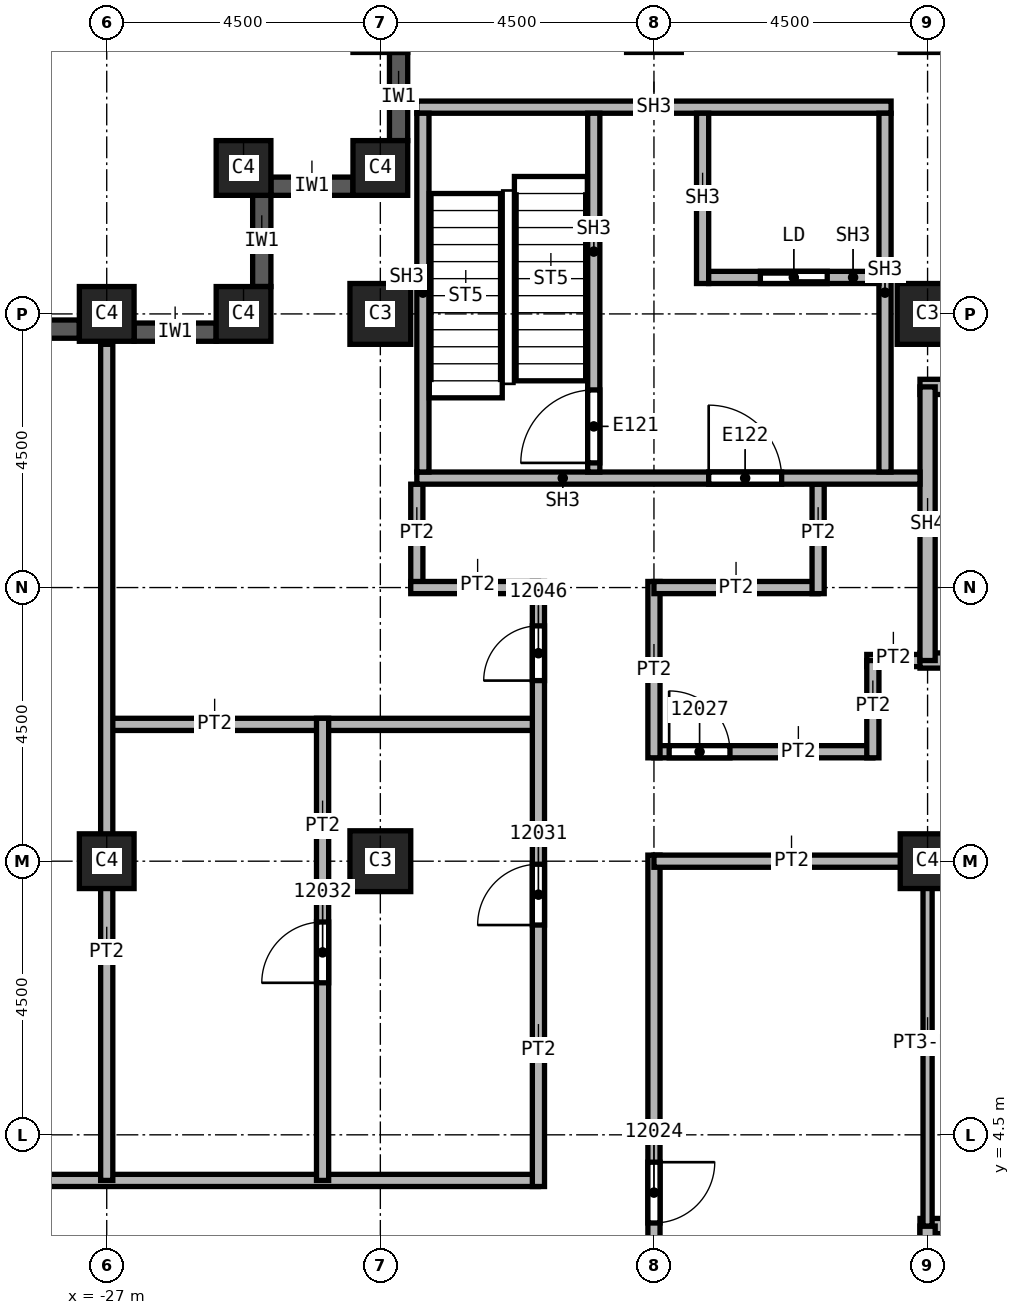
"""IFC4 building model, lengths in metres.
Left out: names, types, materials, properties, quantities, classifications, styles, units other than length and angle.
Written with IfcOpenShell. Run it as: python <this file> out.ifc"""

import sys

from ifc_helpers import new_model, si_unit, direction, frame, frame_2d, origin, origin_2d, place, context, subcontext, project, spatial, rectangle, extrude, element, fill, save


model = new_model("IFC4")
c1 = context("Model", 3, precision=1e-05, world=origin(), true_north=direction((0.0, 1.0)))
c2 = subcontext(c1, "Body", "Model", "MODEL_VIEW")
j1 = project(units=[si_unit("LENGTHUNIT", "METRE"), si_unit("PLANEANGLEUNIT", "RADIAN")], contexts=[c1])
p1 = place(None, origin())
s1 = spatial("IfcSite", under=j1, at=p1, CompositionType="ELEMENT")
p2 = place(p1, origin())
s2 = spatial("IfcBuilding", under=s1, at=p2, CompositionType="ELEMENT")
p3 = place(p2, frame((0.0, 0.0, 196.0)))
s3 = spatial("IfcBuildingStorey", under=s2, at=p3, CompositionType="ELEMENT", Elevation=196.0)
for number, where, z_axis, x_axis in (
    (1, (-13.5, 18.0, 0.0), (0.0, 0.0, 1.0), (1.0, 0.0, 0.0)),
    (2, (-22.5, 9.0, 0.0), (0.0, 0.0, 1.0), (1.0, 0.0, 0.0)),
    (3, (-22.5, 18.0, 0.0), (0.0, 0.0, 1.0), (1.0, 0.0, 0.0)),
):
    element("IfcColumn", number, at=place(p3, frame(where, z_axis=z_axis, x_axis=x_axis)), inside=s3, PredefinedType="COLUMN", context=c2, shape_type="SweptSolid", body=[
        extrude(rectangle(XDim=1.0, YDim=1.0, at=origin_2d()), origin(), (0.0, 0.0, 1.0), 3.72),
    ])
for number, where, z_axis, x_axis in (
    (4, (-13.5, 9.0, 0.0), (0.0, 0.0, 1.0), (1.0, 0.0, 0.0)),
    (5, (-27.0, 9.0, 0.0), (0.0, 0.0, 1.0), (1.0, 0.0, 0.0)),
    (6, (-27.0, 18.0, 0.0), (0.0, 0.0, 1.0), (1.0, 0.0, 0.0)),
    (7, (-22.5, 20.4, 0.0), (0.0, 0.0, 1.0), (1.0, 0.0, 0.0)),
    (8, (-24.75, 20.4, 0.0), (0.0, 0.0, 1.0), (1.0, 0.0, 0.0)),
    (9, (-24.75, 18.0, 0.0), (0.0, 0.0, 1.0), (1.0, 0.0, 0.0)),
):
    element("IfcColumn", number, at=place(p3, frame(where, z_axis=z_axis, x_axis=x_axis)), inside=s3, PredefinedType="COLUMN", context=c2, shape_type="SweptSolid", body=[
        extrude(rectangle(XDim=0.9, YDim=0.9, at=origin_2d()), origin(), (0.0, 0.0, 1.0), 3.72),
    ])
p4 = place(p3, frame((-22.95, 20.1, 0.0), z_axis=(0.0, 0.0, 1.0), x_axis=(-1.0, 0.0, 0.0)))
e10 = element("IfcWall", 10, at=p4, inside=s3, PredefinedType="SOLIDWALL", context=c2, shape_type="SweptSolid", body=[
    extrude(rectangle(XDim=1.35, YDim=0.3, at=frame_2d((0.675, 0.0))), origin(), (0.0, 0.0, 1.0), 3.12),
])
p5 = place(p3, frame((-24.45, 19.95, 0.0), z_axis=(0.0, 0.0, 1.0), x_axis=(0.0, -1.0, 0.0)))
e11 = element("IfcWall", 11, at=p5, inside=s3, PredefinedType="SOLIDWALL", context=c2, shape_type="SweptSolid", body=[
    extrude(rectangle(XDim=1.5, YDim=0.3, at=frame_2d((0.75, 0.0))), origin(), (0.0, 0.0, 1.0), 3.12),
])
p6 = place(p3, frame((-25.2, 17.7, 0.0), z_axis=(0.0, 0.0, 1.0), x_axis=(-1.0, 0.0, 0.0)))
e12 = element("IfcWall", 12, at=p6, inside=s3, PredefinedType="SOLIDWALL", context=c2, shape_type="SweptSolid", body=[
    extrude(rectangle(XDim=1.35, YDim=0.3, at=frame_2d((0.675, 0.0))), origin(), (0.0, 0.0, 1.0), 3.12),
])
p7 = place(p3, frame((-27.45, 17.75, 0.0), z_axis=(0.0, 0.0, 1.0), x_axis=(-1.0, 0.0, 0.0)))
e13 = element("IfcWall", 13, at=p7, inside=s3, PredefinedType="SOLIDWALL", context=c2, shape_type="SweptSolid", body=[
    extrude(rectangle(XDim=3.6, YDim=0.3, at=frame_2d((1.8, 0.0))), origin(), (0.0, 0.0, 1.0), 3.12),
])
p8 = place(p7, frame((0.6, 0.0, 0.8)))
e14 = element("IfcOpeningElement", 14, at=p8, cuts=e13, PredefinedType="OPENING", context=c2, shape_type="SweptSolid", body=[
    extrude(rectangle(XDim=2.4, YDim=1.95, at=frame_2d((1.2, 0.975))), frame((0.0, 0.15, 0.0), z_axis=(0.0, -1.0, 0.0), x_axis=(1.0, 0.0, 0.0)), (0.0, 0.0, 1.0), 0.3),
])
p9 = place(p3, frame((-22.2, 22.3, 0.0), z_axis=(0.0, 0.0, 1.0), x_axis=(0.0, -1.0, 0.0)))
e15 = element("IfcWall", 15, at=p9, inside=s3, PredefinedType="SOLIDWALL", context=c2, shape_type="SweptSolid", body=[
    extrude(rectangle(XDim=1.45, YDim=0.3, at=frame_2d((0.725, 0.0))), origin(), (0.0, 0.0, 1.0), 3.12),
])
p10 = place(p3, frame((-33.85, 3.75, 0.0), z_axis=(0.0, 0.0, 1.0), x_axis=(1.0, 0.0, 0.0)))
e16 = element("IfcWall", 16, at=p10, inside=s3, PredefinedType="PARTITIONING", context=c2, shape_type="SweptSolid", body=[
    extrude(rectangle(XDim=13.95, YDim=0.2, at=frame_2d((6.975, 0.0))), origin(), (0.0, 0.0, 1.0), 3.72),
])
p11 = place(p3, frame((-27.1, 11.25, 0.0), z_axis=(0.0, 0.0, 1.0), x_axis=(1.0, 0.0, 0.0)))
e17 = element("IfcWall", 17, at=p11, inside=s3, PredefinedType="PARTITIONING", context=c2, shape_type="SweptSolid", body=[
    extrude(rectangle(XDim=7.2, YDim=0.2, at=frame_2d((3.6, 0.0))), origin(), (0.0, 0.0, 1.0), 3.72),
])
p12 = place(p3, frame((-27.0, 3.75, 0.0), z_axis=(0.0, 0.0, 1.0), x_axis=(0.0, 1.0, 0.0)))
e18 = element("IfcWall", 18, at=p12, inside=s3, PredefinedType="PARTITIONING", context=c2, shape_type="SweptSolid", body=[
    extrude(rectangle(XDim=13.75, YDim=0.2, at=frame_2d((6.875, 0.0))), origin(), (0.0, 0.0, 1.0), 3.72),
])
p13 = place(p3, frame((-23.45, 3.75, 0.0), z_axis=(0.0, 0.0, 1.0), x_axis=(0.0, 1.0, 0.0)))
e19 = element("IfcWall", 19, at=p13, inside=s3, PredefinedType="PARTITIONING", context=c2, shape_type="SweptSolid", body=[
    extrude(rectangle(XDim=7.6, YDim=0.2, at=frame_2d((3.8, 0.0))), origin(), (0.0, 0.0, 1.0), 3.72),
])
p14 = place(p13, frame((3.25, 0.0, 0.0)))
e20 = element("IfcOpeningElement", 20, at=p14, cuts=e19, PredefinedType="OPENING", context=c2, shape_type="SweptSolid", body=[
    extrude(rectangle(XDim=1.0, YDim=2.1, at=frame_2d((0.5, 1.05))), frame((0.0, 0.1, 0.0), z_axis=(0.0, -1.0, 0.0), x_axis=(1.0, 0.0, 0.0)), (0.0, 0.0, 1.0), 0.2),
])
p15 = place(p3, frame((-21.9, 13.5, 0.0), z_axis=(0.0, 0.0, 1.0), x_axis=(0.0, 1.0, 0.0)))
e21 = element("IfcWall", 21, at=p15, inside=s3, PredefinedType="PARTITIONING", context=c2, shape_type="SweptSolid", body=[
    extrude(rectangle(XDim=1.7, YDim=0.2, at=frame_2d((0.85, 0.0))), origin(), (0.0, 0.0, 1.0), 3.72),
])
p16 = place(p3, frame((-19.9, 3.65, 0.0), z_axis=(0.0, 0.0, 1.0), x_axis=(0.0, 1.0, 0.0)))
e22 = element("IfcWall", 22, at=p16, inside=s3, PredefinedType="PARTITIONING", context=c2, shape_type="SweptSolid", body=[
    extrude(rectangle(XDim=9.95, YDim=0.2, at=frame_2d((4.975, 0.0))), origin(), (0.0, 0.0, 1.0), 3.72),
])
p17 = place(p16, frame((4.3, 0.0, 0.0)))
e23 = element("IfcOpeningElement", 23, at=p17, cuts=e22, PredefinedType="OPENING", context=c2, shape_type="SweptSolid", body=[
    extrude(rectangle(XDim=1.0, YDim=2.1, at=frame_2d((0.5, 1.05))), frame((0.0, 0.1, 0.0), z_axis=(0.0, -1.0, 0.0), x_axis=(1.0, 0.0, 0.0)), (0.0, 0.0, 1.0), 0.2),
])
p18 = place(p16, frame((8.32, 0.0, 0.0)))
e24 = element("IfcOpeningElement", 24, at=p18, cuts=e22, PredefinedType="OPENING", context=c2, shape_type="SweptSolid", body=[
    extrude(rectangle(XDim=0.9, YDim=2.1, at=frame_2d((0.45, 1.05))), frame((0.0, 0.1, 0.0), z_axis=(0.0, -1.0, 0.0), x_axis=(1.0, 0.0, 0.0)), (0.0, 0.0, 1.0), 0.2),
])
p19 = place(p3, frame((-19.9, 13.5, 0.0), z_axis=(0.0, 0.0, 1.0), x_axis=(-1.0, 0.0, 0.0)))
e25 = element("IfcWall", 25, at=p19, inside=s3, PredefinedType="PARTITIONING", context=c2, shape_type="SweptSolid", body=[
    extrude(rectangle(XDim=2.1, YDim=0.2, at=frame_2d((1.05, 0.0))), origin(), (0.0, 0.0, 1.0), 3.72),
])
p20 = place(p3, frame((-18.0, 9.1, 0.0), z_axis=(0.0, 0.0, 1.0), x_axis=(0.0, -1.0, 0.0)))
e26 = element("IfcWall", 26, at=p20, inside=s3, PredefinedType="PARTITIONING", context=c2, shape_type="SweptSolid", body=[
    extrude(rectangle(XDim=18.2, YDim=0.2, at=frame_2d((9.1, 0.0))), origin(), (0.0, 0.0, 1.0), 3.72),
])
p21 = place(p20, frame((14.95, 0.0, 0.0)))
e27 = element("IfcOpeningElement", 27, at=p21, cuts=e26, PredefinedType="OPENING", context=c2, shape_type="SweptSolid", body=[
    extrude(rectangle(XDim=1.0, YDim=2.1, at=frame_2d((0.5, 1.05))), frame((0.0, 0.1, 0.0), z_axis=(0.0, -1.0, 0.0), x_axis=(1.0, 0.0, 0.0)), (0.0, 0.0, 1.0), 0.2),
])
p22 = place(p20, frame((5.05, 0.0, 0.0)))
e28 = element("IfcOpeningElement", 28, at=p22, cuts=e26, PredefinedType="OPENING", context=c2, shape_type="SweptSolid", body=[
    extrude(rectangle(XDim=1.0, YDim=2.1, at=frame_2d((0.5, 1.05))), frame((0.0, 0.1, 0.0), z_axis=(0.0, -1.0, 0.0), x_axis=(1.0, 0.0, 0.0)), (0.0, 0.0, 1.0), 0.2),
])
p23 = place(p3, frame((-18.0, 10.8, 0.0), z_axis=(0.0, 0.0, 1.0), x_axis=(1.0, 0.0, 0.0)))
e29 = element("IfcWall", 29, at=p23, inside=s3, PredefinedType="PARTITIONING", context=c2, shape_type="SweptSolid", body=[
    extrude(rectangle(XDim=3.6, YDim=0.2, at=frame_2d((1.8, 0.0))), origin(), (0.0, 0.0, 1.0), 3.72),
])
p24 = place(p23, frame((0.25, 0.0, 0.0)))
e30 = element("IfcOpeningElement", 30, at=p24, cuts=e29, PredefinedType="OPENING", context=c2, shape_type="SweptSolid", body=[
    extrude(rectangle(XDim=1.0, YDim=2.1, at=frame_2d((0.5, 1.05))), frame((0.0, 0.1, 0.0), z_axis=(0.0, -1.0, 0.0), x_axis=(1.0, 0.0, 0.0)), (0.0, 0.0, 1.0), 0.2),
])
p25 = place(p3, frame((-18.0, 13.6, 0.0), z_axis=(0.0, 0.0, 1.0), x_axis=(0.0, -1.0, 0.0)))
e31 = element("IfcWall", 31, at=p25, inside=s3, PredefinedType="PARTITIONING", context=c2, shape_type="SweptSolid", body=[
    extrude(rectangle(XDim=2.9, YDim=0.2, at=frame_2d((1.45, 0.0))), origin(), (0.0, 0.0, 1.0), 3.72),
])
p26 = place(p3, frame((-15.3, 13.5, 0.0), z_axis=(0.0, 0.0, 1.0), x_axis=(-1.0, 0.0, 0.0)))
e32 = element("IfcWall", 32, at=p26, inside=s3, PredefinedType="PARTITIONING", context=c2, shape_type="SweptSolid", body=[
    extrude(rectangle(XDim=2.7, YDim=0.2, at=frame_2d((1.35, 0.0))), origin(), (0.0, 0.0, 1.0), 3.72),
])
p27 = place(p3, frame((-15.3, 15.2, 0.0), z_axis=(0.0, 0.0, 1.0), x_axis=(0.0, -1.0, 0.0)))
e33 = element("IfcWall", 33, at=p27, inside=s3, PredefinedType="PARTITIONING", context=c2, shape_type="SweptSolid", body=[
    extrude(rectangle(XDim=1.8, YDim=0.2, at=frame_2d((0.9, 0.0))), origin(), (0.0, 0.0, 1.0), 3.72),
])
p28 = place(p3, frame((-14.5, 12.3, 0.0), z_axis=(0.0, 0.0, 1.0), x_axis=(1.0, 0.0, 0.0)))
e34 = element("IfcWall", 34, at=p28, inside=s3, PredefinedType="PARTITIONING", context=c2, shape_type="SweptSolid", body=[
    extrude(rectangle(XDim=1.125, YDim=0.2, at=frame_2d((0.562, 0.0))), origin(), (0.0, 0.0, 1.0), 3.72),
])
p29 = place(p3, frame((-13.5, 9.0, 0.0), z_axis=(0.0, 0.0, 1.0), x_axis=(-1.0, 0.0, 0.0)))
e35 = element("IfcWall", 35, at=p29, inside=s3, PredefinedType="PARTITIONING", context=c2, shape_type="SweptSolid", body=[
    extrude(rectangle(XDim=4.5, YDim=0.2, at=frame_2d((2.25, 0.0))), origin(), (0.0, 0.0, 1.0), 3.72),
])
p30 = place(p3, frame((-14.4, 10.7, 0.0), z_axis=(0.0, 0.0, 1.0), x_axis=(0.0, 1.0, 0.0)))
e36 = element("IfcWall", 36, at=p30, inside=s3, PredefinedType="PARTITIONING", context=c2, shape_type="SweptSolid", body=[
    extrude(rectangle(XDim=1.6, YDim=0.2, at=frame_2d((0.8, 0.0))), origin(), (0.0, 0.0, 1.0), 3.72),
])
p31 = place(p3, frame((-13.625, 3.0, 0.0), z_axis=(0.0, 0.0, 1.0), x_axis=(1.0, 0.0, 0.0)))
e37 = element("IfcWall", 37, at=p31, inside=s3, PredefinedType="SOLIDWALL", context=c2, shape_type="SweptSolid", body=[
    extrude(rectangle(XDim=9.25, YDim=0.25, at=frame_2d((4.625, 0.0))), origin(), (0.0, 0.0, 1.0), 3.72),
])
p32 = place(p31, frame((3.25, 0.0, 0.0)))
e38 = element("IfcOpeningElement", 38, at=p32, cuts=e37, PredefinedType="OPENING", context=c2, shape_type="SweptSolid", body=[
    extrude(rectangle(XDim=1.1, YDim=2.1, at=frame_2d((0.55, 1.05))), frame((0.0, 0.125, 0.0), z_axis=(0.0, -1.0, 0.0), x_axis=(1.0, 0.0, 0.0)), (0.0, 0.0, 1.0), 0.25),
])
p33 = place(p3, frame((-13.5, -3.0, 0.0), z_axis=(0.0, 0.0, 1.0), x_axis=(0.0, 1.0, 0.0)))
e39 = element("IfcWall", 39, at=p33, inside=s3, PredefinedType="SOLIDWALL", context=c2, shape_type="SweptSolid", body=[
    extrude(rectangle(XDim=6.0, YDim=0.25, at=frame_2d((3.0, 0.0))), origin(), (0.0, 0.0, 1.0), 2.958),
])
p34 = place(p3, frame((-13.625, 12.3, 0.0), z_axis=(0.0, 0.0, 1.0), x_axis=(1.0, 0.0, 0.0)))
e40 = element("IfcWall", 40, at=p34, inside=s3, PredefinedType="SOLIDWALL", context=c2, shape_type="SweptSolid", body=[
    extrude(rectangle(XDim=9.25, YDim=0.25, at=frame_2d((4.625, 0.0))), origin(), (0.0, 0.0, 1.0), 3.72),
])
p35 = place(p34, frame((0.85, 0.0, 0.0)))
e41 = element("IfcOpeningElement", 41, at=p35, cuts=e40, PredefinedType="OPENING", context=c2, shape_type="SweptSolid", body=[
    extrude(rectangle(XDim=1.2, YDim=2.1, at=frame_2d((0.6, 1.05))), frame((0.0, 0.125, 0.0), z_axis=(0.0, -1.0, 0.0), x_axis=(1.0, 0.0, 0.0)), (0.0, 0.0, 1.0), 0.25),
])
p36 = place(p3, frame((-13.625, 16.8, 0.0), z_axis=(0.0, 0.0, 1.0), x_axis=(1.0, 0.0, 0.0)))
e42 = element("IfcWall", 42, at=p36, inside=s3, PredefinedType="SOLIDWALL", context=c2, shape_type="SweptSolid", body=[
    extrude(rectangle(XDim=9.25, YDim=0.25, at=frame_2d((4.625, 0.0))), origin(), (0.0, 0.0, 1.0), 3.72),
])
p37 = place(p3, frame((-13.5, 12.3, 0.0), z_axis=(0.0, 0.0, 1.0), x_axis=(0.0, 1.0, 0.0)))
e43 = element("IfcWall", 43, at=p37, inside=s3, PredefinedType="SOLIDWALL", context=c2, shape_type="SweptSolid", body=[
    extrude(rectangle(XDim=4.5, YDim=0.25, at=frame_2d((2.25, 0.0))), origin(), (0.0, 0.0, 1.0), 3.72),
])
p38 = place(p3, frame((-13.575, 9.0, 0.0), z_axis=(0.0, 0.0, 1.0), x_axis=(1.0, 0.0, 0.0)))
e44 = element("IfcWall", 44, at=p38, inside=s3, PredefinedType="PARTITIONING", context=c2, shape_type="SweptSolid", body=[
    extrude(rectangle(XDim=3.075, YDim=0.15, at=frame_2d((1.538, 0.0))), origin(), (0.0, 0.0, 1.0), 2.958),
])
p39 = place(p3, frame((-13.5, 3.0, 0.0), z_axis=(0.0, 0.0, 1.0), x_axis=(0.0, 1.0, 0.0)))
e45 = element("IfcWall", 45, at=p39, inside=s3, PredefinedType="PARTITIONING", context=c2, shape_type="SweptSolid", body=[
    extrude(rectangle(XDim=6.1, YDim=0.15, at=frame_2d((3.05, 0.0))), origin(), (0.0, 0.0, 1.0), 2.958),
])
p40 = place(p3, frame((-21.9, 15.3, 0.0), z_axis=(0.0, 0.0, 1.0), x_axis=(1.0, 0.0, 0.0)))
e46 = element("IfcWall", 46, at=p40, inside=s3, PredefinedType="SOLIDWALL", context=c2, shape_type="SweptSolid", body=[
    extrude(rectangle(XDim=8.275, YDim=0.2, at=frame_2d((4.137, 0.0))), origin(), (0.0, 0.0, 1.0), 3.72),
])
p41 = place(p40, frame((4.8, 0.0, 0.0)))
e47 = element("IfcOpeningElement", 47, at=p41, cuts=e46, PredefinedType="OPENING", context=c2, shape_type="SweptSolid", body=[
    extrude(rectangle(XDim=1.2, YDim=2.1, at=frame_2d((0.6, 1.05))), frame((0.0, 0.1, 0.0), z_axis=(0.0, -1.0, 0.0), x_axis=(1.0, 0.0, 0.0)), (0.0, 0.0, 1.0), 0.2),
])
p42 = place(p3, frame((-21.9, 21.4, 0.0), z_axis=(0.0, 0.0, 1.0), x_axis=(1.0, 0.0, 0.0)))
e48 = element("IfcWall", 48, at=p42, inside=s3, PredefinedType="SOLIDWALL", context=c2, shape_type="SweptSolid", body=[
    extrude(rectangle(XDim=7.8, YDim=0.2, at=frame_2d((3.9, 0.0))), origin(), (0.0, 0.0, 1.0), 3.72),
])
for number, where, z_axis, x_axis in (
    (49, (-21.8, 15.4, 0.0), (0.0, 0.0, 1.0), (0.0, 1.0, 0.0)),
    (50, (-14.2, 15.4, 0.0), (0.0, 0.0, 1.0), (0.0, 1.0, 0.0)),
):
    element("IfcWall", number, at=place(p3, frame(where, z_axis=z_axis, x_axis=x_axis)), inside=s3, PredefinedType="SOLIDWALL", context=c2, shape_type="SweptSolid", body=[
        extrude(rectangle(XDim=5.9, YDim=0.2, at=frame_2d((2.95, 0.0))), origin(), (0.0, 0.0, 1.0), 3.72),
    ])
p43 = place(p3, frame((-18.99, 15.4, 0.0), z_axis=(0.0, 0.0, 1.0), x_axis=(0.0, 1.0, 0.0)))
e51 = element("IfcWall", 51, at=p43, inside=s3, PredefinedType="SOLIDWALL", context=c2, shape_type="SweptSolid", body=[
    extrude(rectangle(XDim=5.9, YDim=0.2, at=frame_2d((2.95, 0.0))), origin(), (0.0, 0.0, 1.0), 3.72),
])
p44 = place(p43, frame((0.15, 0.0, 0.0)))
e52 = element("IfcOpeningElement", 52, at=p44, cuts=e51, PredefinedType="OPENING", context=c2, shape_type="SweptSolid", body=[
    extrude(rectangle(XDim=1.2, YDim=2.1, at=frame_2d((0.6, 1.05))), frame((0.0, 0.1, 0.0), z_axis=(0.0, -1.0, 0.0), x_axis=(1.0, 0.0, 0.0)), (0.0, 0.0, 1.0), 0.2),
])
p45 = place(p3, frame((-17.2, 18.5, 0.0), z_axis=(0.0, 0.0, 1.0), x_axis=(0.0, 1.0, 0.0)))
e53 = element("IfcWall", 53, at=p45, inside=s3, PredefinedType="SOLIDWALL", context=c2, shape_type="SweptSolid", body=[
    extrude(rectangle(XDim=2.8, YDim=0.2, at=frame_2d((1.4, 0.0))), origin(), (0.0, 0.0, 1.0), 3.72),
])
p46 = place(p3, frame((-17.1, 18.6, 0.0), z_axis=(0.0, 0.0, 1.0), x_axis=(1.0, 0.0, 0.0)))
e54 = element("IfcWall", 54, at=p46, inside=s3, PredefinedType="SOLIDWALL", context=c2, shape_type="SweptSolid", body=[
    extrude(rectangle(XDim=2.8, YDim=0.2, at=frame_2d((1.4, 0.0))), origin(), (0.0, 0.0, 1.0), 3.72),
])
p47 = place(p46, frame((0.85, 0.0, 0.0)))
e55 = element("IfcOpeningElement", 55, at=p47, cuts=e54, PredefinedType="OPENING", context=c2, shape_type="SweptSolid", body=[
    extrude(rectangle(XDim=1.1, YDim=2.1, at=frame_2d((0.55, 1.05))), frame((0.0, 0.1, 0.0), z_axis=(0.0, -1.0, 0.0), x_axis=(1.0, 0.0, 0.0)), (0.0, 0.0, 1.0), 0.2),
])
p48 = place(p22, origin())
e56 = element("IfcDoor", 56, at=p48, inside=s3, OperationType="SINGLE_SWING_LEFT", PredefinedType="DOOR", context=c2, shape_type="SweptSolid", body=[
    extrude(rectangle(XDim=1.0, YDim=2.1, at=frame_2d((0.5, 1.05))), frame((0.0, 0.025, 0.0), z_axis=(0.0, -1.0, 0.0), x_axis=(1.0, 0.0, 0.0)), (0.0, 0.0, 1.0), 0.05),
])
fill(e28, e56)
p49 = place(p24, origin())
e57 = element("IfcDoor", 57, at=p49, inside=s3, OperationType="SINGLE_SWING_RIGHT", PredefinedType="DOOR", context=c2, shape_type="SweptSolid", body=[
    extrude(rectangle(XDim=1.0, YDim=2.1, at=frame_2d((0.5, 1.05))), frame((0.0, 0.025, 0.0), z_axis=(0.0, -1.0, 0.0), x_axis=(1.0, 0.0, 0.0)), (0.0, 0.0, 1.0), 0.05),
])
fill(e30, e57)
p50 = place(p17, origin())
e58 = element("IfcDoor", 58, at=p50, inside=s3, OperationType="SINGLE_SWING_RIGHT", PredefinedType="DOOR", context=c2, shape_type="SweptSolid", body=[
    extrude(rectangle(XDim=1.0, YDim=2.1, at=frame_2d((0.5, 1.05))), frame((0.0, 0.025, 0.0), z_axis=(0.0, -1.0, 0.0), x_axis=(1.0, 0.0, 0.0)), (0.0, 0.0, 1.0), 0.05),
])
fill(e23, e58)
p51 = place(p14, origin())
e59 = element("IfcDoor", 59, at=p51, inside=s3, OperationType="SINGLE_SWING_LEFT", PredefinedType="DOOR", context=c2, shape_type="SweptSolid", body=[
    extrude(rectangle(XDim=1.0, YDim=2.1, at=frame_2d((0.5, 1.05))), frame((0.0, 0.025, 0.0), z_axis=(0.0, -1.0, 0.0), x_axis=(1.0, 0.0, 0.0)), (0.0, 0.0, 1.0), 0.05),
])
fill(e20, e59)
p52 = place(p18, origin())
e60 = element("IfcDoor", 60, at=p52, inside=s3, OperationType="SINGLE_SWING_LEFT", PredefinedType="DOOR", context=c2, shape_type="SweptSolid", body=[
    extrude(rectangle(XDim=0.9, YDim=2.1, at=frame_2d((0.45, 1.05))), frame((0.0, 0.025, 0.0), z_axis=(0.0, -1.0, 0.0), x_axis=(1.0, 0.0, 0.0)), (0.0, 0.0, 1.0), 0.05),
])
fill(e24, e60)
p53 = place(p44, origin())
e61 = element("IfcDoor", 61, at=p53, inside=s3, OperationType="SINGLE_SWING_LEFT", PredefinedType="DOOR", context=c2, shape_type="SweptSolid", body=[
    extrude(rectangle(XDim=1.2, YDim=2.1, at=frame_2d((0.6, 1.05))), frame((0.0, 0.025, 0.0), z_axis=(0.0, -1.0, 0.0), x_axis=(1.0, 0.0, 0.0)), (0.0, 0.0, 1.0), 0.05),
])
fill(e52, e61)
p54 = place(p47, origin())
e62 = element("IfcDoor", 62, at=p54, inside=s3, OperationType="SLIDING_TO_LEFT", PredefinedType="DOOR", context=c2, shape_type="SweptSolid", body=[
    extrude(rectangle(XDim=1.1, YDim=2.1, at=frame_2d((0.55, 1.05))), frame((0.0, 0.025, 0.0), z_axis=(0.0, -1.0, 0.0), x_axis=(1.0, 0.0, 0.0)), (0.0, 0.0, 1.0), 0.05),
])
fill(e55, e62)
p55 = place(p41, origin())
e63 = element("IfcDoor", 63, at=p55, inside=s3, OperationType="SINGLE_SWING_RIGHT", PredefinedType="DOOR", context=c2, shape_type="SweptSolid", body=[
    extrude(rectangle(XDim=1.2, YDim=2.1, at=frame_2d((0.6, 1.05))), frame((0.0, 0.025, 0.0), z_axis=(0.0, -1.0, 0.0), x_axis=(1.0, 0.0, 0.0)), (0.0, 0.0, 1.0), 0.05),
])
fill(e47, e63)
save(model, sys.argv[1])
